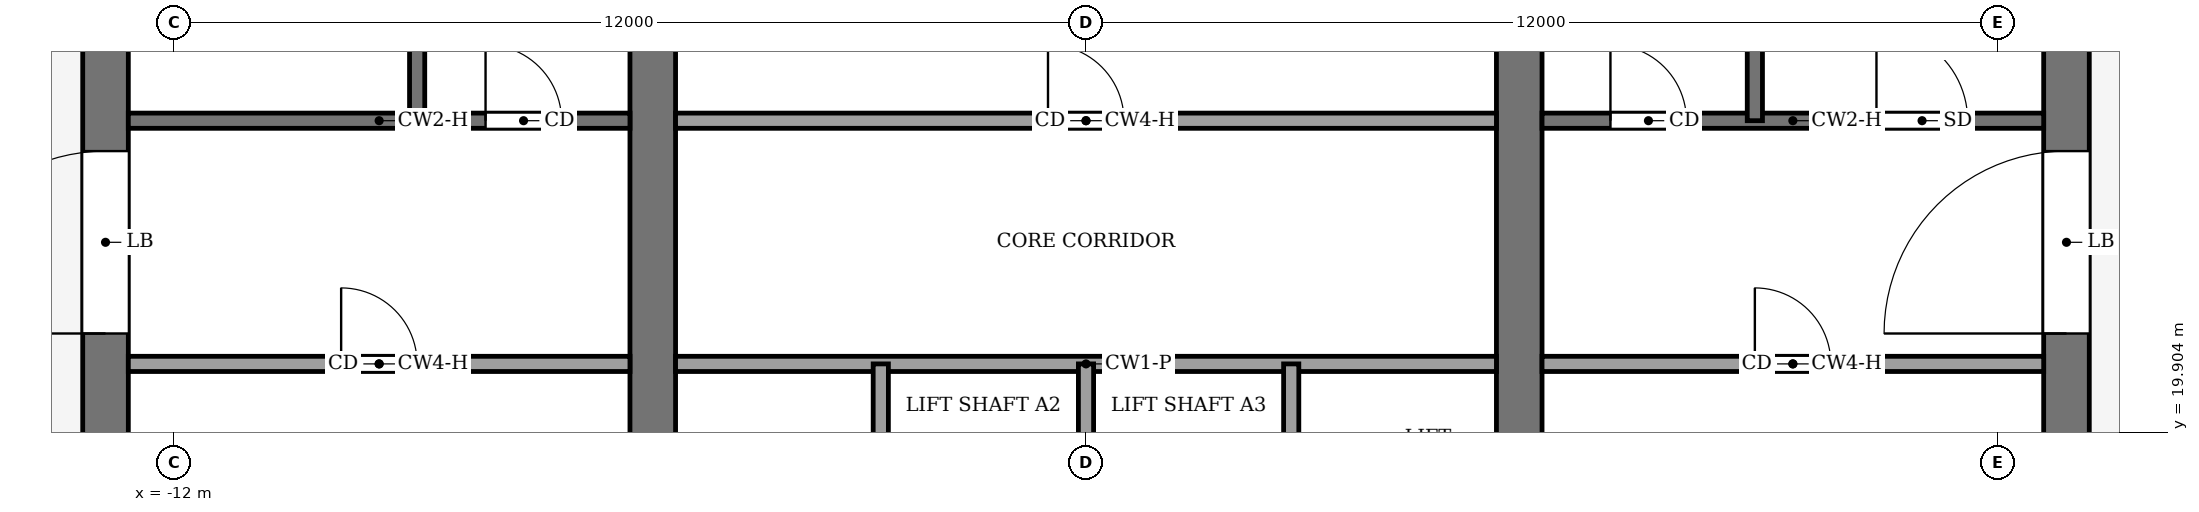
"""IFC4 building model, lengths in metres.
Left out: names, types, materials, properties, quantities, classifications, styles, units other than length and angle.
Written with IfcOpenShell. Run it as: python <this file> out.ifc"""

import sys

from ifc_helpers import new_model, si_unit, direction, frame, frame_2d, origin, place, context, subcontext, project, spatial, rectangle, extrude, element, fill, save


model = new_model("IFC4")
c1 = context("Model", 3, precision=1e-05, world=origin(), true_north=direction((0.0, 1.0)))
c2 = subcontext(c1, "Body", "Model", "MODEL_VIEW")
j1 = project(units=[si_unit("LENGTHUNIT", "METRE"), si_unit("PLANEANGLEUNIT", "RADIAN")], contexts=[c1])
p1 = place(None, origin())
s1 = spatial("IfcSite", under=j1, at=p1, CompositionType="ELEMENT")
p2 = place(p1, origin())
s2 = spatial("IfcBuilding", under=s1, at=p2, CompositionType="ELEMENT")
p3 = place(p2, frame((0.0, 0.0, 340.5)))
s3 = spatial("IfcBuildingStorey", under=s2, at=p3, CompositionType="ELEMENT", Elevation=340.5)
p4 = place(p3, frame((-12.9, 18.4, -0.15), z_axis=(0.0, 0.0, 1.0), x_axis=(0.0, 1.0, 0.0)))
e1 = element("IfcWall", 1, at=p4, inside=s3, PredefinedType="SHEAR", context=c2, shape_type="SweptSolid", body=[
    extrude(rectangle(XDim=19.2, YDim=0.6, at=frame_2d((9.6, 0.0))), origin(), (0.0, 0.0, 1.0), 9.0),
])
p5 = place(p4, frame((2.8, 0.0, 0.15)))
e2 = element("IfcOpeningElement", 2, at=p5, cuts=e1, PredefinedType="OPENING", context=c2, shape_type="SweptSolid", body=[
    extrude(rectangle(XDim=2.4, YDim=2.4, at=frame_2d((1.2, 1.2))), frame((0.0, 0.31, 0.0), z_axis=(0.0, -1.0, 0.0), x_axis=(1.0, 0.0, 0.0)), (0.0, 0.0, 1.0), 0.62),
])
p6 = place(p4, frame((13.4, 0.0, 0.15)))
e3 = element("IfcOpeningElement", 3, at=p6, cuts=e1, PredefinedType="OPENING", context=c2, shape_type="SweptSolid", body=[
    extrude(rectangle(XDim=1.4, YDim=2.2, at=frame_2d((0.7, 1.1))), frame((0.0, 0.31, 0.0), z_axis=(0.0, -1.0, 0.0), x_axis=(1.0, 0.0, 0.0)), (0.0, 0.0, 1.0), 0.62),
])
p7 = place(p3, frame((12.9, 18.4, -0.15), z_axis=(0.0, 0.0, 1.0), x_axis=(0.0, 1.0, 0.0)))
e4 = element("IfcWall", 4, at=p7, inside=s3, PredefinedType="SHEAR", context=c2, shape_type="SweptSolid", body=[
    extrude(rectangle(XDim=19.2, YDim=0.6, at=frame_2d((9.6, 0.0))), origin(), (0.0, 0.0, 1.0), 9.0),
])
p8 = place(p7, frame((2.8, 0.0, 0.15)))
e5 = element("IfcOpeningElement", 5, at=p8, cuts=e4, PredefinedType="OPENING", context=c2, shape_type="SweptSolid", body=[
    extrude(rectangle(XDim=2.4, YDim=2.4, at=frame_2d((1.2, 1.2))), frame((0.0, 0.31, 0.0), z_axis=(0.0, -1.0, 0.0), x_axis=(1.0, 0.0, 0.0)), (0.0, 0.0, 1.0), 0.62),
])
p9 = place(p7, frame((13.3, 0.0, 0.15)))
e6 = element("IfcOpeningElement", 6, at=p9, cuts=e4, PredefinedType="OPENING", context=c2, shape_type="SweptSolid", body=[
    extrude(rectangle(XDim=2.4, YDim=2.4, at=frame_2d((1.2, 1.2))), frame((0.0, 0.31, 0.0), z_axis=(0.0, -1.0, 0.0), x_axis=(1.0, 0.0, 0.0)), (0.0, 0.0, 1.0), 0.62),
])
p10 = place(p3, frame((-5.7, 18.4, -0.15), z_axis=(0.0, 0.0, 1.0), x_axis=(0.0, 1.0, 0.0)))
e7 = element("IfcWall", 7, at=p10, inside=s3, PredefinedType="SHEAR", context=c2, shape_type="SweptSolid", body=[
    extrude(rectangle(XDim=19.2, YDim=0.6, at=frame_2d((9.6, 0.0))), origin(), (0.0, 0.0, 1.0), 9.0),
])
p11 = place(p10, frame((8.35, 0.0, 0.15)))
e8 = element("IfcOpeningElement", 8, at=p11, cuts=e7, PredefinedType="OPENING", context=c2, shape_type="SweptSolid", body=[
    extrude(rectangle(XDim=0.9, YDim=2.1, at=frame_2d((0.45, 1.05))), frame((0.0, 0.31, 0.0), z_axis=(0.0, -1.0, 0.0), x_axis=(1.0, 0.0, 0.0)), (0.0, 0.0, 1.0), 0.62),
])
p12 = place(p3, frame((5.7, 18.4, -0.15), z_axis=(0.0, 0.0, 1.0), x_axis=(0.0, 1.0, 0.0)))
e9 = element("IfcWall", 9, at=p12, inside=s3, PredefinedType="SHEAR", context=c2, shape_type="SweptSolid", body=[
    extrude(rectangle(XDim=19.2, YDim=0.6, at=frame_2d((9.6, 0.0))), origin(), (0.0, 0.0, 1.0), 9.0),
])
p13 = place(p12, frame((13.3, 0.0, 0.15)))
e10 = element("IfcOpeningElement", 10, at=p13, cuts=e9, PredefinedType="OPENING", context=c2, shape_type="SweptSolid", body=[
    extrude(rectangle(XDim=2.4, YDim=2.4, at=frame_2d((1.2, 1.2))), frame((0.0, 0.31, 0.0), z_axis=(0.0, -1.0, 0.0), x_axis=(1.0, 0.0, 0.0)), (0.0, 0.0, 1.0), 0.62),
])
p14 = place(p3, frame((-12.6, 20.8, 0.0), z_axis=(0.0, 0.0, 1.0), x_axis=(1.0, 0.0, 0.0)))
e11 = element("IfcWall", 11, at=p14, inside=s3, PredefinedType="PARTITIONING", context=c2, shape_type="SweptSolid", body=[
    extrude(rectangle(XDim=6.6, YDim=0.2, at=frame_2d((3.3, 0.0))), origin(), (0.0, 0.0, 1.0), 8.85),
])
p15 = place(p14, frame((2.8, 0.0, 0.0)))
e12 = element("IfcOpeningElement", 12, at=p15, cuts=e11, PredefinedType="OPENING", context=c2, shape_type="SweptSolid", body=[
    extrude(rectangle(XDim=1.0, YDim=2.1, at=frame_2d((0.5, 1.05))), frame((0.0, 0.11, 0.0), z_axis=(0.0, -1.0, 0.0), x_axis=(1.0, 0.0, 0.0)), (0.0, 0.0, 1.0), 0.22),
])
p16 = place(p3, frame((-5.4, 20.8, 0.0), z_axis=(0.0, 0.0, 1.0), x_axis=(1.0, 0.0, 0.0)))
e13 = element("IfcWall", 13, at=p16, inside=s3, PredefinedType="PARTITIONING", context=c2, shape_type="SweptSolid", body=[
    extrude(rectangle(XDim=10.8, YDim=0.2, at=frame_2d((5.4, 0.0))), origin(), (0.0, 0.0, 1.0), 8.85),
])
p17 = place(p3, frame((6.0, 20.8, 0.0), z_axis=(0.0, 0.0, 1.0), x_axis=(1.0, 0.0, 0.0)))
e14 = element("IfcWall", 14, at=p17, inside=s3, PredefinedType="PARTITIONING", context=c2, shape_type="SweptSolid", body=[
    extrude(rectangle(XDim=6.6, YDim=0.2, at=frame_2d((3.3, 0.0))), origin(), (0.0, 0.0, 1.0), 8.85),
])
p18 = place(p17, frame((2.8, 0.0, 0.0)))
e15 = element("IfcOpeningElement", 15, at=p18, cuts=e14, PredefinedType="OPENING", context=c2, shape_type="SweptSolid", body=[
    extrude(rectangle(XDim=1.0, YDim=2.1, at=frame_2d((0.5, 1.05))), frame((0.0, 0.11, 0.0), z_axis=(0.0, -1.0, 0.0), x_axis=(1.0, 0.0, 0.0)), (0.0, 0.0, 1.0), 0.22),
])
p19 = place(p3, frame((-12.6, 24.0, 0.0), z_axis=(0.0, 0.0, 1.0), x_axis=(1.0, 0.0, 0.0)))
e16 = element("IfcWall", 16, at=p19, inside=s3, PredefinedType="PARTITIONING", context=c2, shape_type="SweptSolid", body=[
    extrude(rectangle(XDim=6.6, YDim=0.2, at=frame_2d((3.3, 0.0))), origin(), (0.0, 0.0, 1.0), 8.85),
])
p20 = place(p19, frame((4.7, 0.0, 0.0)))
e17 = element("IfcOpeningElement", 17, at=p20, cuts=e16, PredefinedType="OPENING", context=c2, shape_type="SweptSolid", body=[
    extrude(rectangle(XDim=1.0, YDim=2.1, at=frame_2d((0.5, 1.05))), frame((0.0, 0.11, 0.0), z_axis=(0.0, -1.0, 0.0), x_axis=(1.0, 0.0, 0.0)), (0.0, 0.0, 1.0), 0.22),
])
p21 = place(p3, frame((-5.4, 24.0, 0.0), z_axis=(0.0, 0.0, 1.0), x_axis=(1.0, 0.0, 0.0)))
e18 = element("IfcWall", 18, at=p21, inside=s3, PredefinedType="PARTITIONING", context=c2, shape_type="SweptSolid", body=[
    extrude(rectangle(XDim=10.8, YDim=0.2, at=frame_2d((5.4, 0.0))), origin(), (0.0, 0.0, 1.0), 8.85),
])
p22 = place(p21, frame((4.9, 0.0, 0.0)))
e19 = element("IfcOpeningElement", 19, at=p22, cuts=e18, PredefinedType="OPENING", context=c2, shape_type="SweptSolid", body=[
    extrude(rectangle(XDim=1.0, YDim=2.1, at=frame_2d((0.5, 1.05))), frame((0.0, 0.11, 0.0), z_axis=(0.0, -1.0, 0.0), x_axis=(1.0, 0.0, 0.0)), (0.0, 0.0, 1.0), 0.22),
])
p23 = place(p3, frame((6.0, 24.0, 0.0), z_axis=(0.0, 0.0, 1.0), x_axis=(1.0, 0.0, 0.0)))
e20 = element("IfcWall", 20, at=p23, inside=s3, PredefinedType="PARTITIONING", context=c2, shape_type="SweptSolid", body=[
    extrude(rectangle(XDim=6.6, YDim=0.2, at=frame_2d((3.3, 0.0))), origin(), (0.0, 0.0, 1.0), 8.85),
])
p24 = place(p23, frame((0.9, 0.0, 0.0)))
e21 = element("IfcOpeningElement", 21, at=p24, cuts=e20, PredefinedType="OPENING", context=c2, shape_type="SweptSolid", body=[
    extrude(rectangle(XDim=1.0, YDim=2.1, at=frame_2d((0.5, 1.05))), frame((0.0, 0.11, 0.0), z_axis=(0.0, -1.0, 0.0), x_axis=(1.0, 0.0, 0.0)), (0.0, 0.0, 1.0), 0.22),
])
p25 = place(p23, frame((4.4, 0.0, 0.0)))
e22 = element("IfcOpeningElement", 22, at=p25, cuts=e20, PredefinedType="OPENING", context=c2, shape_type="SweptSolid", body=[
    extrude(rectangle(XDim=1.2, YDim=2.2, at=frame_2d((0.6, 1.1))), frame((0.0, 0.11, 0.0), z_axis=(0.0, -1.0, 0.0), x_axis=(1.0, 0.0, 0.0)), (0.0, 0.0, 1.0), 0.22),
])
p26 = place(p3, frame((-8.8, 24.0, 0.0), z_axis=(0.0, 0.0, 1.0), x_axis=(0.0, 1.0, 0.0)))
e23 = element("IfcWall", 23, at=p26, inside=s3, PredefinedType="PARTITIONING", context=c2, shape_type="SweptSolid", body=[
    extrude(rectangle(XDim=7.4, YDim=0.2, at=frame_2d((3.7, 0.0))), origin(), (0.0, 0.0, 1.0), 8.85),
])
for number, where, z_axis, x_axis in (
    (24, (-2.7, 18.4, 0.0), (0.0, 0.0, 1.0), (0.0, 1.0, 0.0)),
    (25, (0.0, 18.4, 0.0), (0.0, 0.0, 1.0), (0.0, 1.0, 0.0)),
    (26, (2.7, 18.4, 0.0), (0.0, 0.0, 1.0), (0.0, 1.0, 0.0)),
):
    element("IfcWall", number, at=place(p3, frame(where, z_axis=z_axis, x_axis=x_axis)), inside=s3, PredefinedType="PARTITIONING", context=c2, shape_type="SweptSolid", body=[
        extrude(rectangle(XDim=2.4, YDim=0.2, at=frame_2d((1.2, 0.0))), origin(), (0.0, 0.0, 1.0), 8.85),
    ])
p27 = place(p3, frame((8.8, 24.0, 0.0), z_axis=(0.0, 0.0, 1.0), x_axis=(0.0, 1.0, 0.0)))
e27 = element("IfcWall", 27, at=p27, inside=s3, PredefinedType="PARTITIONING", context=c2, shape_type="SweptSolid", body=[
    extrude(rectangle(XDim=7.4, YDim=0.2, at=frame_2d((3.7, 0.0))), origin(), (0.0, 0.0, 1.0), 8.85),
])
p28 = place(p22, origin())
e28 = element("IfcDoor", 28, at=p28, inside=s3, OperationType="SINGLE_SWING_LEFT", PredefinedType="DOOR", context=c2, shape_type="SweptSolid", body=[
    extrude(rectangle(XDim=1.0, YDim=2.1, at=frame_2d((0.5, 1.05))), frame((0.0, 0.025, 0.0), z_axis=(0.0, -1.0, 0.0), x_axis=(1.0, 0.0, 0.0)), (0.0, 0.0, 1.0), 0.05),
])
fill(e19, e28)
p29 = place(p15, origin())
e29 = element("IfcDoor", 29, at=p29, inside=s3, OperationType="SINGLE_SWING_RIGHT", PredefinedType="DOOR", context=c2, shape_type="SweptSolid", body=[
    extrude(rectangle(XDim=1.0, YDim=2.1, at=frame_2d((0.5, 1.05))), frame((0.0, 0.025, 0.0), z_axis=(0.0, -1.0, 0.0), x_axis=(1.0, 0.0, 0.0)), (0.0, 0.0, 1.0), 0.05),
])
fill(e12, e29)
p30 = place(p18, origin())
e30 = element("IfcDoor", 30, at=p30, inside=s3, OperationType="SINGLE_SWING_LEFT", PredefinedType="DOOR", context=c2, shape_type="SweptSolid", body=[
    extrude(rectangle(XDim=1.0, YDim=2.1, at=frame_2d((0.5, 1.05))), frame((0.0, 0.025, 0.0), z_axis=(0.0, -1.0, 0.0), x_axis=(1.0, 0.0, 0.0)), (0.0, 0.0, 1.0), 0.05),
])
fill(e15, e30)
p31 = place(p20, origin())
e31 = element("IfcDoor", 31, at=p31, inside=s3, OperationType="SINGLE_SWING_LEFT", PredefinedType="DOOR", context=c2, shape_type="SweptSolid", body=[
    extrude(rectangle(XDim=1.0, YDim=2.1, at=frame_2d((0.5, 1.05))), frame((0.0, 0.025, 0.0), z_axis=(0.0, -1.0, 0.0), x_axis=(1.0, 0.0, 0.0)), (0.0, 0.0, 1.0), 0.05),
])
fill(e17, e31)
p32 = place(p24, origin())
e32 = element("IfcDoor", 32, at=p32, inside=s3, OperationType="SINGLE_SWING_RIGHT", PredefinedType="DOOR", context=c2, shape_type="SweptSolid", body=[
    extrude(rectangle(XDim=1.0, YDim=2.1, at=frame_2d((0.5, 1.05))), frame((0.0, 0.025, 0.0), z_axis=(0.0, -1.0, 0.0), x_axis=(1.0, 0.0, 0.0)), (0.0, 0.0, 1.0), 0.05),
])
fill(e21, e32)
p33 = place(p25, origin())
e33 = element("IfcDoor", 33, at=p33, inside=s3, OperationType="SINGLE_SWING_RIGHT", PredefinedType="DOOR", context=c2, shape_type="SweptSolid", body=[
    extrude(rectangle(XDim=1.2, YDim=2.2, at=frame_2d((0.6, 1.1))), frame((0.0, 0.025, 0.0), z_axis=(0.0, -1.0, 0.0), x_axis=(1.0, 0.0, 0.0)), (0.0, 0.0, 1.0), 0.05),
])
fill(e22, e33)
p34 = place(p5, origin())
e34 = element("IfcDoor", 34, at=p34, inside=s3, OperationType="DOUBLE_DOOR_SINGLE_SWING", PredefinedType="DOOR", context=c2, shape_type="SweptSolid", body=[
    extrude(rectangle(XDim=2.4, YDim=2.4, at=frame_2d((1.2, 1.2))), frame((0.0, 0.025, 0.0), z_axis=(0.0, -1.0, 0.0), x_axis=(1.0, 0.0, 0.0)), (0.0, 0.0, 1.0), 0.05),
])
fill(e2, e34)
p35 = place(p8, origin())
e35 = element("IfcDoor", 35, at=p35, inside=s3, OperationType="DOUBLE_DOOR_SINGLE_SWING", PredefinedType="DOOR", context=c2, shape_type="SweptSolid", body=[
    extrude(rectangle(XDim=2.4, YDim=2.4, at=frame_2d((1.2, 1.2))), frame((0.0, 0.025, 0.0), z_axis=(0.0, -1.0, 0.0), x_axis=(1.0, 0.0, 0.0)), (0.0, 0.0, 1.0), 0.05),
])
fill(e5, e35)
save(model, sys.argv[1])
